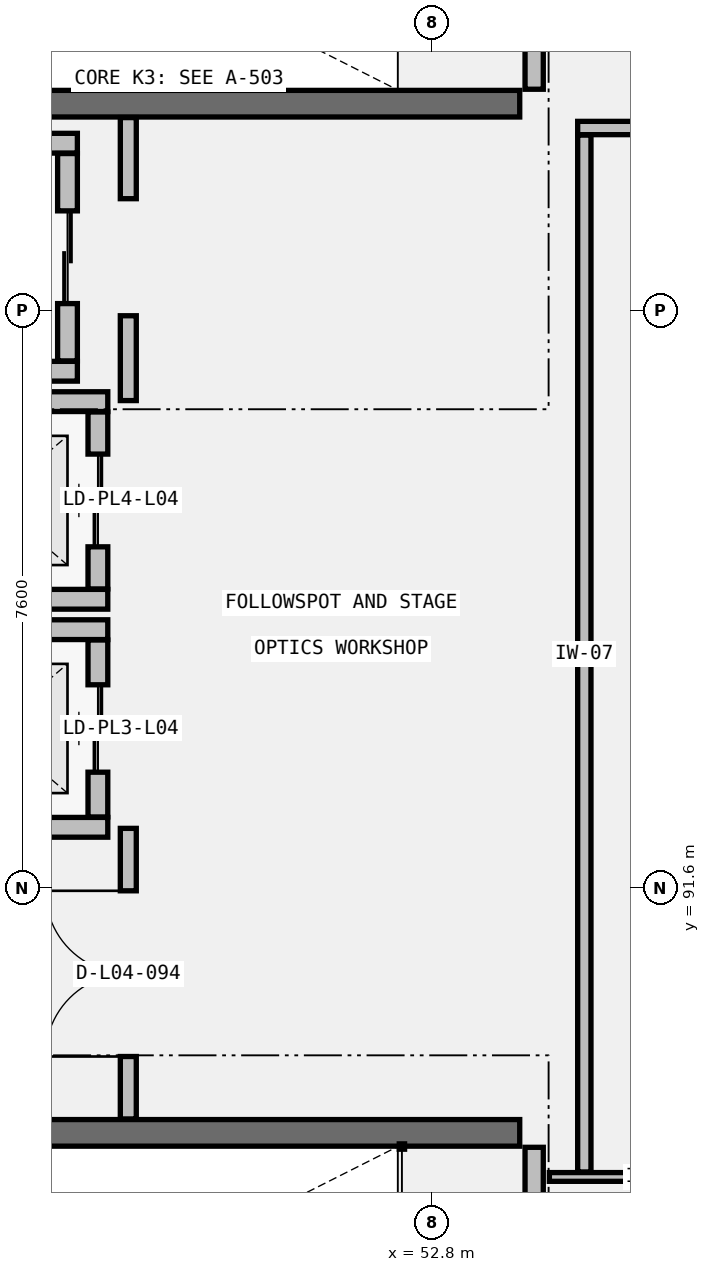
"""IFC4 building model, lengths in metres.
Left out: names, types, materials, properties, quantities, classifications, styles, units other than length and angle.
Written with IfcOpenShell. Run it as: python <this file> out.ifc"""

import sys

from ifc_helpers import new_model, si_unit, direction, frame, frame_2d, origin, place, context, subcontext, project, spatial, rectangle, extrude, element, fill, save


model = new_model("IFC4")
c1 = context("Model", 3, precision=1e-05, world=origin(), true_north=direction((0.0, 1.0)))
c2 = subcontext(c1, "Body", "Model", "MODEL_VIEW")
j1 = project(units=[si_unit("LENGTHUNIT", "METRE"), si_unit("PLANEANGLEUNIT", "RADIAN")], contexts=[c1])
p1 = place(None, origin())
s1 = spatial("IfcSite", under=j1, at=p1, CompositionType="ELEMENT")
p2 = place(p1, origin())
s2 = spatial("IfcBuilding", under=s1, at=p2, CompositionType="ELEMENT")
p3 = place(p2, frame((0.0, 0.0, 19.2)))
s3 = spatial("IfcBuildingStorey", under=s2, at=p3, CompositionType="ELEMENT", Elevation=19.2)
for number, where, z_axis, x_axis in (
    (1, (53.95, 88.38, 0.0), (0.0, 0.0, 1.0), (-1.0, 0.0, 0.0)),
    (2, (45.8, 101.92, 0.0), (0.0, 0.0, 1.0), (1.0, 0.0, 0.0)),
):
    element("IfcWall", number, at=place(p3, frame(where, z_axis=z_axis, x_axis=x_axis)), inside=s3, PredefinedType="SHEAR", context=c2, shape_type="SweptSolid", body=[
        extrude(rectangle(XDim=8.15, YDim=0.35, at=frame_2d((4.075, 0.0))), origin(), (0.0, 0.0, 1.0), 4.34),
    ])
p4 = place(p3, frame((54.14, 88.19, 0.0), z_axis=(0.0, 0.0, 1.0), x_axis=(0.0, -1.0, 0.0)))
e3 = element("IfcWall", 3, at=p4, inside=s3, PredefinedType="STANDARD", context=c2, shape_type="SweptSolid", body=[
    extrude(rectangle(XDim=3.28, YDim=0.24, at=frame_2d((1.64, 0.0))), origin(), (0.0, 0.0, 1.0), 4.34),
])
p5 = place(p4, frame((0.915, 0.0, 0.0)))
e4 = element("IfcOpeningElement", 4, at=p5, cuts=e3, PredefinedType="OPENING", context=c2, shape_type="SweptSolid", body=[
    extrude(rectangle(XDim=1.45, YDim=2.2, at=frame_2d((0.725, 1.1))), frame((0.0, 0.13, 0.0), z_axis=(0.0, -1.0, 0.0), x_axis=(1.0, 0.0, 0.0)), (0.0, 0.0, 1.0), 0.26),
])
p6 = place(p3, frame((54.14, 105.39, 0.0), z_axis=(0.0, 0.0, 1.0), x_axis=(0.0, -1.0, 0.0)))
e5 = element("IfcWall", 5, at=p6, inside=s3, PredefinedType="STANDARD", context=c2, shape_type="SweptSolid", body=[
    extrude(rectangle(XDim=3.28, YDim=0.24, at=frame_2d((1.64, 0.0))), origin(), (0.0, 0.0, 1.0), 4.34),
])
p7 = place(p6, frame((0.915, 0.0, 0.0)))
e6 = element("IfcOpeningElement", 6, at=p7, cuts=e5, PredefinedType="OPENING", context=c2, shape_type="SweptSolid", body=[
    extrude(rectangle(XDim=1.45, YDim=2.2, at=frame_2d((0.725, 1.1))), frame((0.0, 0.13, 0.0), z_axis=(0.0, -1.0, 0.0), x_axis=(1.0, 0.0, 0.0)), (0.0, 0.0, 1.0), 0.26),
])
for number, where, z_axis, x_axis in (
    (7, (45.47, 92.4, 0.0), (0.0, 0.0, 1.0), (1.0, 0.0, 0.0)),
    (8, (45.47, 95.0, 0.0), (0.0, 0.0, 1.0), (1.0, 0.0, 0.0)),
):
    element("IfcWall", number, at=place(p3, frame(where, z_axis=z_axis, x_axis=x_axis)), inside=s3, PredefinedType="STANDARD", context=c2, shape_type="SweptSolid", body=[
        extrude(rectangle(XDim=3.06, YDim=0.26, at=frame_2d((1.53, 0.0))), origin(), (0.0, 0.0, 1.0), 4.34),
    ])
p8 = place(p3, frame((48.4, 92.536, 0.0), z_axis=(0.0, 0.0, 1.0), x_axis=(0.0, 1.0, 0.0)))
e9 = element("IfcWall", 9, at=p8, inside=s3, PredefinedType="STANDARD", context=c2, shape_type="SweptSolid", body=[
    extrude(rectangle(XDim=2.328, YDim=0.26, at=frame_2d((1.164, 0.0))), origin(), (0.0, 0.0, 1.0), 4.34),
])
p9 = place(p8, frame((0.589, 0.0, 0.0)))
e10 = element("IfcOpeningElement", 10, at=p9, cuts=e9, PredefinedType="OPENING", context=c2, shape_type="SweptSolid", body=[
    extrude(rectangle(XDim=1.15, YDim=2.15, at=frame_2d((0.575, 1.075))), frame((0.0, 0.14, 0.0), z_axis=(0.0, -1.0, 0.0), x_axis=(1.0, 0.0, 0.0)), (0.0, 0.0, 1.0), 0.28),
])
for number, where, z_axis, x_axis in (
    (11, (45.47, 95.4, 0.0), (0.0, 0.0, 1.0), (1.0, 0.0, 0.0)),
    (12, (45.47, 98.0, 0.0), (0.0, 0.0, 1.0), (1.0, 0.0, 0.0)),
):
    element("IfcWall", number, at=place(p3, frame(where, z_axis=z_axis, x_axis=x_axis)), inside=s3, PredefinedType="STANDARD", context=c2, shape_type="SweptSolid", body=[
        extrude(rectangle(XDim=3.06, YDim=0.26, at=frame_2d((1.53, 0.0))), origin(), (0.0, 0.0, 1.0), 4.34),
    ])
p10 = place(p3, frame((48.4, 95.536, 0.0), z_axis=(0.0, 0.0, 1.0), x_axis=(0.0, 1.0, 0.0)))
e13 = element("IfcWall", 13, at=p10, inside=s3, PredefinedType="STANDARD", context=c2, shape_type="SweptSolid", body=[
    extrude(rectangle(XDim=2.328, YDim=0.26, at=frame_2d((1.164, 0.0))), origin(), (0.0, 0.0, 1.0), 4.34),
])
p11 = place(p10, frame((0.554, 0.0, 0.0)))
e14 = element("IfcOpeningElement", 14, at=p11, cuts=e13, PredefinedType="OPENING", context=c2, shape_type="SweptSolid", body=[
    extrude(rectangle(XDim=1.22, YDim=2.2, at=frame_2d((0.61, 1.1))), frame((0.0, 0.14, 0.0), z_axis=(0.0, -1.0, 0.0), x_axis=(1.0, 0.0, 0.0)), (0.0, 0.0, 1.0), 0.28),
])
for number, where, z_axis, x_axis in (
    (15, (45.47, 98.4, 0.0), (0.0, 0.0, 1.0), (1.0, 0.0, 0.0)),
    (16, (45.47, 101.4, 0.0), (0.0, 0.0, 1.0), (1.0, 0.0, 0.0)),
):
    element("IfcWall", number, at=place(p3, frame(where, z_axis=z_axis, x_axis=x_axis)), inside=s3, PredefinedType="STANDARD", context=c2, shape_type="SweptSolid", body=[
        extrude(rectangle(XDim=2.66, YDim=0.26, at=frame_2d((1.33, 0.0))), origin(), (0.0, 0.0, 1.0), 4.34),
    ])
p12 = place(p3, frame((48.0, 98.536, 0.0), z_axis=(0.0, 0.0, 1.0), x_axis=(0.0, 1.0, 0.0)))
e17 = element("IfcWall", 17, at=p12, inside=s3, PredefinedType="STANDARD", context=c2, shape_type="SweptSolid", body=[
    extrude(rectangle(XDim=2.728, YDim=0.26, at=frame_2d((1.364, 0.0))), origin(), (0.0, 0.0, 1.0), 4.34),
])
p13 = place(p12, frame((0.754, 0.0, 0.0)))
e18 = element("IfcOpeningElement", 18, at=p13, cuts=e17, PredefinedType="OPENING", context=c2, shape_type="SweptSolid", body=[
    extrude(rectangle(XDim=1.22, YDim=2.2, at=frame_2d((0.61, 1.1))), frame((0.0, 0.14, 0.0), z_axis=(0.0, -1.0, 0.0), x_axis=(1.0, 0.0, 0.0)), (0.0, 0.0, 1.0), 0.28),
])
p14 = place(p3, frame((54.34, 87.8, 0.0), z_axis=(0.0, 0.0, 1.0), x_axis=(1.0, 0.0, 0.0)))
e19 = element("IfcWall", 19, at=p14, inside=s3, PredefinedType="PARTITIONING", context=c2, shape_type="SweptSolid", body=[
    extrude(rectangle(XDim=6.517, YDim=0.115, at=frame_2d((3.259, 0.0))), origin(), (0.0, 0.0, 1.0), 4.34),
])
p15 = place(p14, frame((2.779, 0.0, 0.0)))
e20 = element("IfcOpeningElement", 20, at=p15, cuts=e19, PredefinedType="OPENING", context=c2, shape_type="SweptSolid", body=[
    extrude(rectangle(XDim=0.96, YDim=2.08, at=frame_2d((0.48, 1.04))), frame((0.0, 0.067, 0.0), z_axis=(0.0, -1.0, 0.0), x_axis=(1.0, 0.0, 0.0)), (0.0, 0.0, 1.0), 0.135),
])
p16 = place(p3, frame((54.712, 101.6, 0.0), z_axis=(0.0, 0.0, 1.0), x_axis=(1.0, 0.0, 0.0)))
e21 = element("IfcWall", 21, at=p16, inside=s3, PredefinedType="PARTITIONING", context=c2, shape_type="SweptSolid", body=[
    extrude(rectangle(XDim=6.175, YDim=0.175, at=frame_2d((3.087, 0.0))), origin(), (0.0, 0.0, 1.0), 4.34),
])
p17 = place(p16, frame((2.558, 0.0, 0.0)))
e22 = element("IfcOpeningElement", 22, at=p17, cuts=e21, PredefinedType="OPENING", context=c2, shape_type="SweptSolid", body=[
    extrude(rectangle(XDim=1.06, YDim=2.15, at=frame_2d((0.53, 1.075))), frame((0.0, 0.097, 0.0), z_axis=(0.0, -1.0, 0.0), x_axis=(1.0, 0.0, 0.0)), (0.0, 0.0, 1.0), 0.195),
])
p18 = place(p3, frame((54.8, 87.865, 0.0), z_axis=(0.0, 0.0, 1.0), x_axis=(0.0, 1.0, 0.0)))
e23 = element("IfcWall", 23, at=p18, inside=s3, PredefinedType="PARTITIONING", context=c2, shape_type="SweptSolid", body=[
    extrude(rectangle(XDim=13.641, YDim=0.175, at=frame_2d((6.821, 0.0))), origin(), (0.0, 0.0, 1.0), 4.34),
])
p19 = place(p3, frame((48.8, 88.563, 0.0), z_axis=(0.0, 0.0, 1.0), x_axis=(0.0, 1.0, 0.0)))
e24 = element("IfcWall", 24, at=p19, inside=s3, PredefinedType="PARTITIONING", context=c2, shape_type="SweptSolid", body=[
    extrude(rectangle(XDim=3.823, YDim=0.21, at=frame_2d((1.912, 0.0))), origin(), (0.0, 0.0, 1.0), 4.34),
])
p20 = place(p19, frame((0.822, 0.0, 0.0)))
e25 = element("IfcOpeningElement", 25, at=p20, cuts=e24, PredefinedType="OPENING", context=c2, shape_type="SweptSolid", body=[
    extrude(rectangle(XDim=2.18, YDim=2.58, at=frame_2d((1.09, 1.29))), frame((0.0, 0.115, 0.0), z_axis=(0.0, -1.0, 0.0), x_axis=(1.0, 0.0, 0.0)), (0.0, 0.0, 1.0), 0.23),
])
p21 = place(p3, frame((48.8, 98.014, 0.0), z_axis=(0.0, 0.0, 1.0), x_axis=(0.0, 1.0, 0.0)))
e26 = element("IfcWall", 26, at=p21, inside=s3, PredefinedType="PARTITIONING", context=c2, shape_type="SweptSolid", body=[
    extrude(rectangle(XDim=1.116, YDim=0.21, at=frame_2d((0.558, 0.0))), origin(), (0.0, 0.0, 1.0), 4.34),
])
p22 = place(p3, frame((48.8, 100.67, 0.0), z_axis=(0.0, 0.0, 1.0), x_axis=(0.0, 1.0, 0.0)))
e27 = element("IfcWall", 27, at=p22, inside=s3, PredefinedType="PARTITIONING", context=c2, shape_type="SweptSolid", body=[
    extrude(rectangle(XDim=1.067, YDim=0.21, at=frame_2d((0.534, 0.0))), origin(), (0.0, 0.0, 1.0), 4.34),
])
p23 = place(p9, origin())
e28 = element("IfcDoor", 28, at=p23, inside=s3, OperationType="SLIDING_TO_LEFT", PredefinedType="DOOR", context=c2, shape_type="SweptSolid", body=[
    extrude(rectangle(XDim=1.15, YDim=2.15, at=frame_2d((0.575, 1.075))), frame((0.0, 0.025, 0.0), z_axis=(0.0, -1.0, 0.0), x_axis=(1.0, 0.0, 0.0)), (0.0, 0.0, 1.0), 0.05),
])
fill(e10, e28)
p24 = place(p11, origin())
e29 = element("IfcDoor", 29, at=p24, inside=s3, OperationType="SLIDING_TO_RIGHT", PredefinedType="DOOR", context=c2, shape_type="SweptSolid", body=[
    extrude(rectangle(XDim=1.22, YDim=2.2, at=frame_2d((0.61, 1.1))), frame((0.0, 0.025, 0.0), z_axis=(0.0, -1.0, 0.0), x_axis=(1.0, 0.0, 0.0)), (0.0, 0.0, 1.0), 0.05),
])
fill(e14, e29)
p25 = place(p13, origin())
e30 = element("IfcDoor", 30, at=p25, inside=s3, OperationType="SLIDING_TO_LEFT", PredefinedType="DOOR", context=c2, shape_type="SweptSolid", body=[
    extrude(rectangle(XDim=1.22, YDim=2.2, at=frame_2d((0.61, 1.1))), frame((0.0, 0.025, 0.0), z_axis=(0.0, -1.0, 0.0), x_axis=(1.0, 0.0, 0.0)), (0.0, 0.0, 1.0), 0.05),
])
fill(e18, e30)
p26 = place(p20, origin())
e31 = element("IfcDoor", 31, at=p26, inside=s3, OperationType="DOUBLE_DOOR_SINGLE_SWING", PredefinedType="DOOR", context=c2, shape_type="SweptSolid", body=[
    extrude(rectangle(XDim=2.18, YDim=2.58, at=frame_2d((1.09, 1.29))), frame((0.0, 0.025, 0.0), z_axis=(0.0, -1.0, 0.0), x_axis=(1.0, 0.0, 0.0)), (0.0, 0.0, 1.0), 0.05),
])
fill(e25, e31)
save(model, sys.argv[1])
